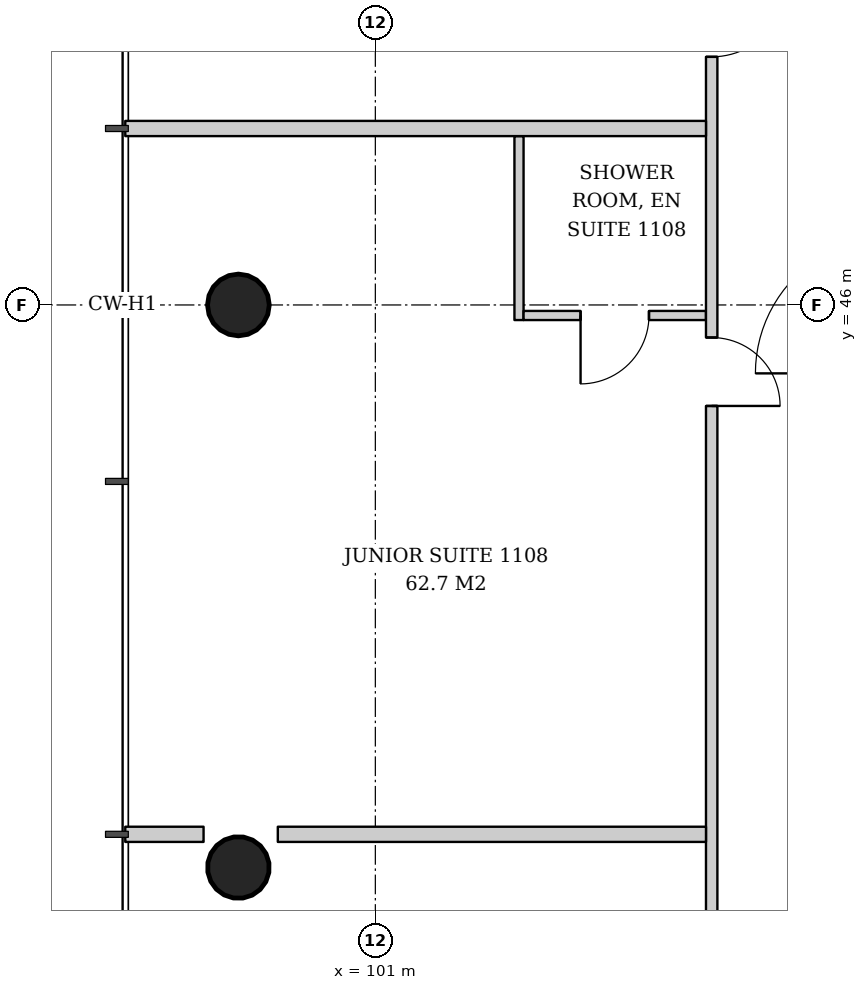
"""IFC4 building model, lengths in metres.
Left out: names, types, materials, properties, quantities, classifications, styles, units other than length and angle.
Written with IfcOpenShell. Run it as: python <this file> out.ifc"""

import sys

from ifc_helpers import new_model, si_unit, direction, frame, frame_2d, origin, origin_2d, place, context, subcontext, project, spatial, rectangle, hollow_circle, extrude, element, fill, save


model = new_model("IFC4")
c1 = context("Model", 3, precision=1e-05, world=origin(), true_north=direction((0.0, 1.0)))
c2 = subcontext(c1, "Body", "Model", "MODEL_VIEW")
j1 = project(units=[si_unit("LENGTHUNIT", "METRE"), si_unit("PLANEANGLEUNIT", "RADIAN")], contexts=[c1])
p1 = place(None, origin())
s1 = spatial("IfcSite", under=j1, at=p1, CompositionType="ELEMENT")
p2 = place(p1, origin())
s2 = spatial("IfcBuilding", under=s1, at=p2, CompositionType="ELEMENT")
p3 = place(p2, frame((0.0, 0.0, 47.6)))
s3 = spatial("IfcBuildingStorey", under=s2, at=p3, CompositionType="ELEMENT", Elevation=47.6)
p4 = place(p3, frame((99.146, 46.0, 0.0), z_axis=(0.043072300418, 0.0, 0.999071957837), x_axis=(0.0, 1.0, 0.0)))
e1 = element("IfcColumn", 1, at=p4, inside=s3, PredefinedType="COLUMN", context=c2, shape_type="SweptSolid", body=[
    extrude(hollow_circle(Radius=0.406, WallThickness=0.03, at=origin_2d()), origin(), (0.0, 0.0, 1.0), 3.803),
])
p5 = place(p3, frame((99.146, 38.573, 0.0), z_axis=(0.043062285527, 0.021563230905, 0.998839660125), x_axis=(-0.44774654769, 0.894160516368, 0.0)))
e2 = element("IfcColumn", 2, at=p5, inside=s3, PredefinedType="COLUMN", context=c2, shape_type="SweptSolid", body=[
    extrude(hollow_circle(Radius=0.406, WallThickness=0.03, at=origin_2d()), origin(), (0.0, 0.0, 1.0), 3.804),
])
p6 = place(p3, frame((102.89, 48.221, 0.0), z_axis=(0.0, 0.0, 1.0), x_axis=(0.0, -1.0, 0.0)))
e3 = element("IfcWall", 3, at=p6, inside=s3, PredefinedType="PARTITIONING", context=c2, shape_type="SweptSolid", body=[
    extrude(rectangle(XDim=2.42, YDim=0.12, at=frame_2d((1.21, 0.0))), origin(), (0.0, 0.0, 1.0), 2.847),
])
p7 = place(p3, frame((105.35, 45.861, 0.0), z_axis=(0.0, 0.0, 1.0), x_axis=(-1.0, 0.0, 0.0)))
e4 = element("IfcWall", 4, at=p7, inside=s3, PredefinedType="PARTITIONING", context=c2, shape_type="SweptSolid", body=[
    extrude(rectangle(XDim=2.4, YDim=0.12, at=frame_2d((1.2, 0.0))), origin(), (0.0, 0.0, 1.0), 3.6),
])
p8 = place(p7, frame((0.75, 0.0, 0.0)))
e5 = element("IfcOpeningElement", 5, at=p8, cuts=e4, PredefinedType="OPENING", context=c2, shape_type="SweptSolid", body=[
    extrude(rectangle(XDim=0.9, YDim=2.1, at=frame_2d((0.45, 1.05))), frame((0.0, 0.07, 0.0), z_axis=(0.0, -1.0, 0.0), x_axis=(1.0, 0.0, 0.0)), (0.0, 0.0, 1.0), 0.14),
])
p9 = place(p3, frame((105.425, 57.65, 0.0), z_axis=(0.0, 0.0, 1.0), x_axis=(0.0, -1.0, 0.0)))
e6 = element("IfcWall", 6, at=p9, inside=s3, PredefinedType="PARTITIONING", context=c2, shape_type="SweptSolid", body=[
    extrude(rectangle(XDim=23.15, YDim=0.15, at=frame_2d((11.575, 0.0))), origin(), (0.0, 0.0, 1.0), 2.8),
])
p10 = place(p9, frame((1.918, 0.0, 0.0)))
e7 = element("IfcOpeningElement", 7, at=p10, cuts=e6, PredefinedType="OPENING", context=c2, shape_type="SweptSolid", body=[
    extrude(rectangle(XDim=0.9, YDim=2.1, at=frame_2d((0.45, 1.05))), frame((0.0, 0.085, 0.0), z_axis=(0.0, -1.0, 0.0), x_axis=(1.0, 0.0, 0.0)), (0.0, 0.0, 1.0), 0.17),
])
p11 = place(p9, frame((7.386, 0.0, 0.0)))
e8 = element("IfcOpeningElement", 8, at=p11, cuts=e6, PredefinedType="OPENING", context=c2, shape_type="SweptSolid", body=[
    extrude(rectangle(XDim=1.0, YDim=2.1, at=frame_2d((0.5, 1.05))), frame((0.0, 0.085, 0.0), z_axis=(0.0, -1.0, 0.0), x_axis=(1.0, 0.0, 0.0)), (0.0, 0.0, 1.0), 0.17),
])
p12 = place(p9, frame((12.079, 0.0, 0.0)))
e9 = element("IfcOpeningElement", 9, at=p12, cuts=e6, PredefinedType="OPENING", context=c2, shape_type="SweptSolid", body=[
    extrude(rectangle(XDim=0.9, YDim=2.1, at=frame_2d((0.45, 1.05))), frame((0.0, 0.085, 0.0), z_axis=(0.0, -1.0, 0.0), x_axis=(1.0, 0.0, 0.0)), (0.0, 0.0, 1.0), 0.17),
])
p13 = place(p3, frame((105.35, 48.322, 0.0), z_axis=(0.0, 0.0, 1.0), x_axis=(-1.0, 0.0, 0.0)))
e10 = element("IfcWall", 10, at=p13, inside=s3, PredefinedType="PARTITIONING", context=c2, shape_type="SweptSolid", body=[
    extrude(rectangle(XDim=7.64, YDim=0.2, at=frame_2d((3.82, 0.0))), origin(), (0.0, 0.0, 1.0), 3.05),
])
p14 = place(p3, frame((105.35, 39.036, 0.0), z_axis=(0.0, 0.0, 1.0), x_axis=(-1.0, 0.0, 0.0)))
e11 = element("IfcWall", 11, at=p14, inside=s3, PredefinedType="PARTITIONING", context=c2, shape_type="SweptSolid", body=[
    extrude(rectangle(XDim=5.633, YDim=0.2, at=frame_2d((2.817, 0.0))), origin(), (0.0, 0.0, 1.0), 3.6),
])
p15 = place(p3, frame((98.74, 39.036, 0.0), z_axis=(0.0, 0.0, 1.0), x_axis=(-1.0, 0.0, 0.0)))
e12 = element("IfcWall", 12, at=p15, inside=s3, PredefinedType="PARTITIONING", context=c2, shape_type="SweptSolid", body=[
    extrude(rectangle(XDim=1.03, YDim=0.2, at=frame_2d((0.515, 0.0))), origin(), (0.0, 0.0, 1.0), 3.6),
])
p16 = place(p8, origin())
e13 = element("IfcDoor", 13, at=p16, inside=s3, OperationType="SINGLE_SWING_RIGHT", PredefinedType="DOOR", context=c2, shape_type="SweptSolid", body=[
    extrude(rectangle(XDim=0.9, YDim=2.1, at=frame_2d((0.45, 1.05))), frame((0.0, 0.025, 0.0), z_axis=(0.0, -1.0, 0.0), x_axis=(1.0, 0.0, 0.0)), (0.0, 0.0, 1.0), 0.05),
])
fill(e5, e13)
p17 = place(p11, origin())
e14 = element("IfcDoor", 14, at=p17, inside=s3, OperationType="SINGLE_SWING_LEFT", PredefinedType="DOOR", context=c2, shape_type="SweptSolid", body=[
    extrude(rectangle(XDim=1.0, YDim=2.1, at=frame_2d((0.5, 1.05))), frame((0.0, 0.025, 0.0), z_axis=(0.0, -1.0, 0.0), x_axis=(1.0, 0.0, 0.0)), (0.0, 0.0, 1.0), 0.05),
])
fill(e8, e14)
p18 = place(p12, origin())
e15 = element("IfcDoor", 15, at=p18, inside=s3, OperationType="SINGLE_SWING_RIGHT", PredefinedType="DOOR", context=c2, shape_type="SweptSolid", body=[
    extrude(rectangle(XDim=0.9, YDim=2.1, at=frame_2d((0.45, 1.05))), frame((0.0, 0.025, 0.0), z_axis=(0.0, -1.0, 0.0), x_axis=(1.0, 0.0, 0.0)), (0.0, 0.0, 1.0), 0.05),
])
fill(e9, e15)
save(model, sys.argv[1])
